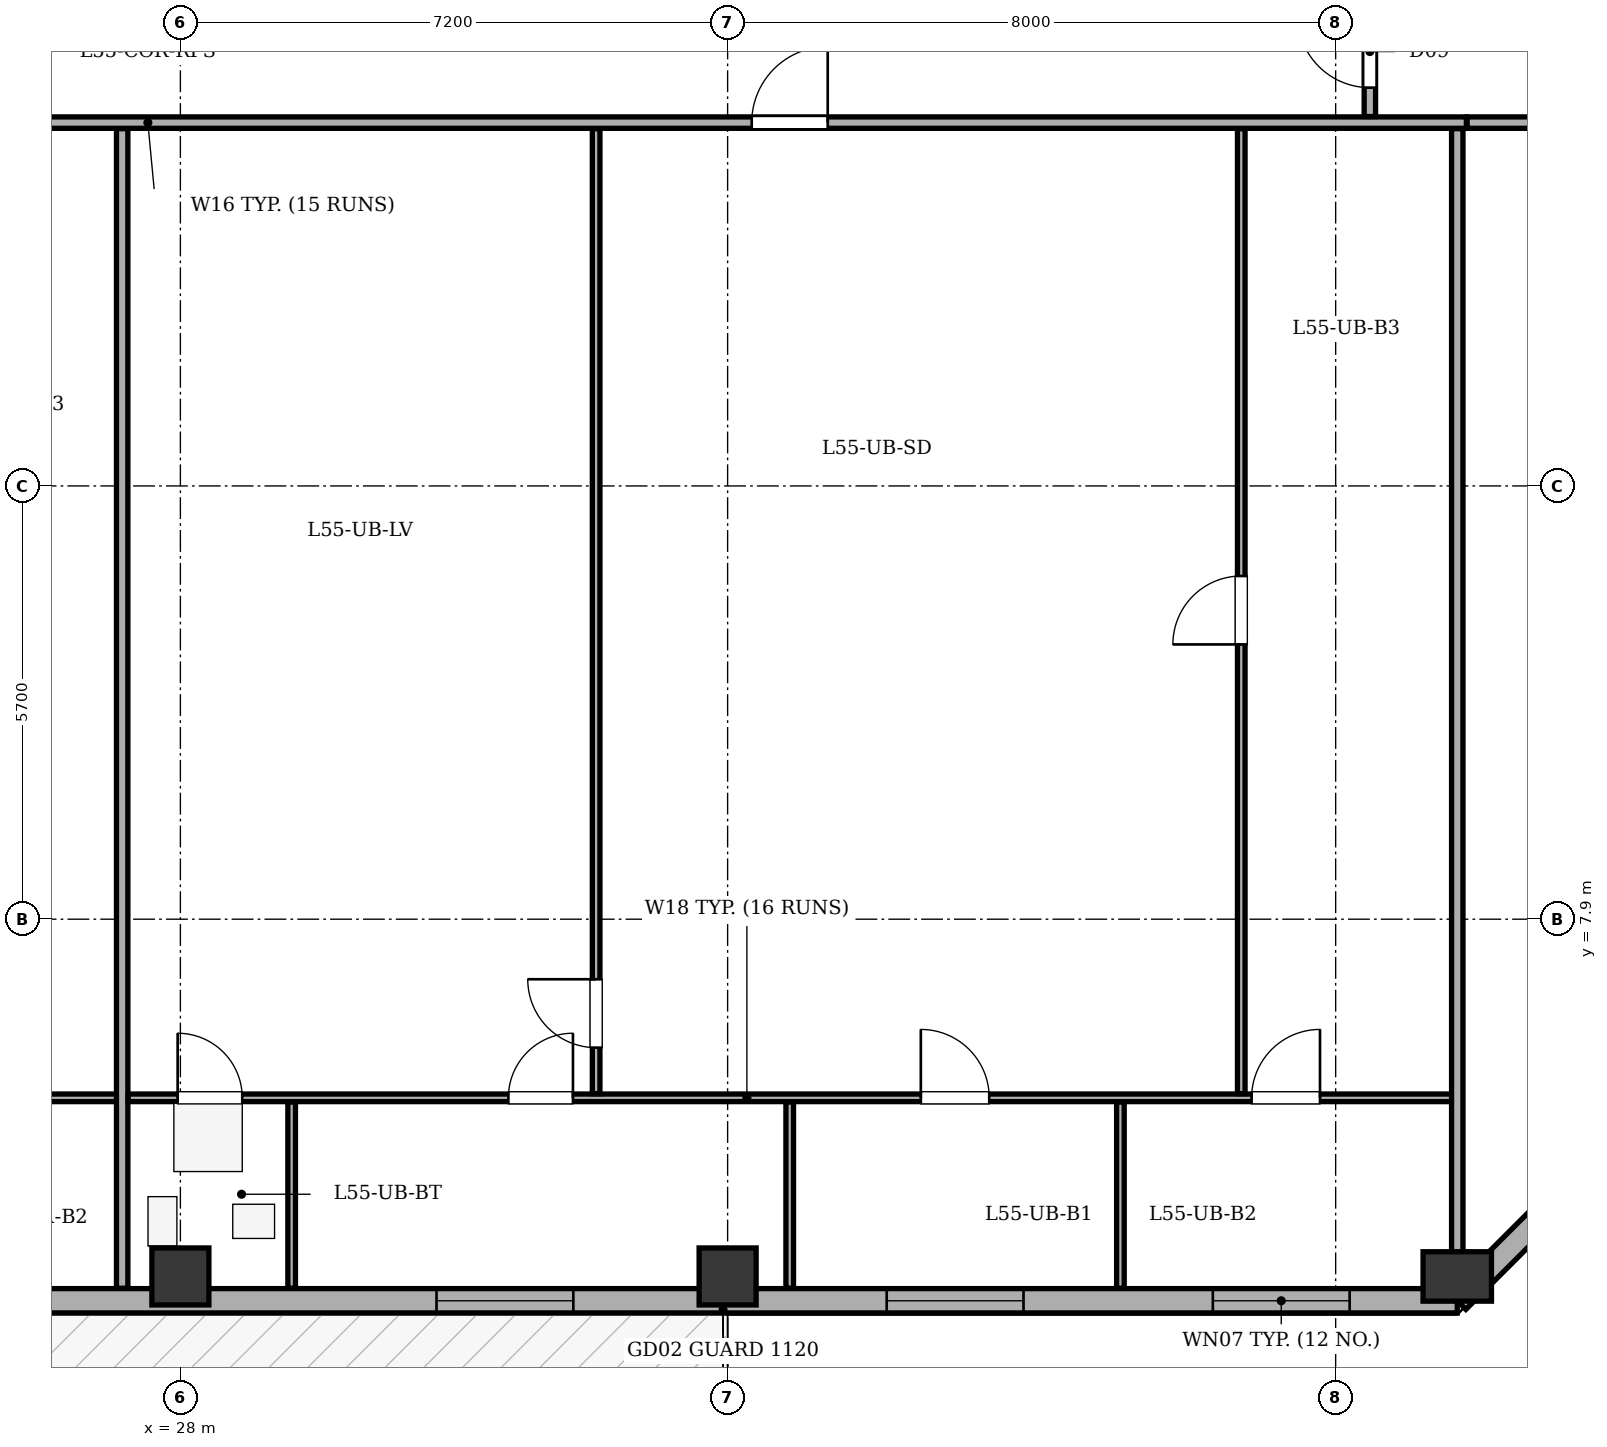
"""IFC4 building model, lengths in metres.
Left out: names, types, materials, properties, quantities, classifications, styles, units other than length and angle.
Written with IfcOpenShell. Run it as: python <this file> out.ifc"""

import sys

from ifc_helpers import new_model, si_unit, direction, frame, frame_2d, origin, origin_2d, place, context, subcontext, project, spatial, rectangle, extrude, element, fill, save


model = new_model("IFC4")
c1 = context("Model", 3, precision=1e-05, world=origin(), true_north=direction((0.0, 1.0)))
c2 = subcontext(c1, "Body", "Model", "MODEL_VIEW")
j1 = project(units=[si_unit("LENGTHUNIT", "METRE"), si_unit("PLANEANGLEUNIT", "RADIAN")], contexts=[c1])
p1 = place(None, origin())
s1 = spatial("IfcSite", under=j1, at=p1, CompositionType="ELEMENT")
p2 = place(p1, origin())
s2 = spatial("IfcBuilding", under=s1, at=p2, CompositionType="ELEMENT")
p3 = place(p2, frame((0.0, 0.0, 214.3)))
s3 = spatial("IfcBuildingStorey", under=s2, at=p3, CompositionType="ELEMENT", Elevation=214.3)
for number, where, z_axis, x_axis in (
    (1, (28.0, 3.2, 0.0), (0.0, 0.0, 1.0), (1.0, 0.0, 0.0)),
    (2, (35.2, 3.2, 0.0), (0.0, 0.0, 1.0), (1.0, 0.0, 0.0)),
):
    element("IfcColumn", number, at=place(p3, frame(where, z_axis=z_axis, x_axis=x_axis)), inside=s3, PredefinedType="COLUMN", context=c2, shape_type="SweptSolid", body=[
        extrude(rectangle(XDim=0.75, YDim=0.75, at=origin_2d()), origin(), (0.0, 0.0, 1.0), 3.4),
    ])
p4 = place(p3, frame((44.8, 3.2, 0.0), z_axis=(0.0, 0.0, 1.0), x_axis=(1.0, 0.0, 0.0)))
e3 = element("IfcColumn", 3, at=p4, inside=s3, PredefinedType="COLUMN", context=c2, shape_type="SweptSolid", body=[
    extrude(rectangle(XDim=0.65, YDim=0.9, at=origin_2d()), origin(), (0.0, 0.0, 1.0), 3.4),
])
p5 = place(p3, frame((44.8, 2.88, 0.0), z_axis=(0.0, 0.0, 1.0), x_axis=(-1.0, 0.0, 0.0)))
e4 = element("IfcWall", 4, at=p5, inside=s3, PredefinedType="STANDARD", context=c2, shape_type="SweptSolid", body=[
    extrude(rectangle(XDim=36.0, YDim=0.32, at=frame_2d((18.0, 0.0))), origin(), (0.0, 0.0, 1.0), 2.725),
])
p6 = place(p5, frame((20.1, 0.0, 0.0)))
e5 = element("IfcOpeningElement", 5, at=p6, cuts=e4, PredefinedType="OPENING", context=c2, shape_type="SweptSolid", body=[
    extrude(rectangle(XDim=1.0, YDim=2.02, at=frame_2d((0.5, 1.01))), frame((0.0, 0.17, 0.0), z_axis=(0.0, -1.0, 0.0), x_axis=(1.0, 0.0, 0.0)), (0.0, 0.0, 1.0), 0.34),
])
p7 = place(p5, frame((1.416, 0.0, 0.75)))
e6 = element("IfcOpeningElement", 6, at=p7, cuts=e4, PredefinedType="OPENING", context=c2, shape_type="SweptSolid", body=[
    extrude(rectangle(XDim=1.8, YDim=1.7, at=frame_2d((0.9, 0.85))), frame((0.0, 0.17, 0.0), z_axis=(0.0, -1.0, 0.0), x_axis=(1.0, 0.0, 0.0)), (0.0, 0.0, 1.0), 0.34),
])
p8 = place(p5, frame((5.707, 0.0, 0.75)))
e7 = element("IfcOpeningElement", 7, at=p8, cuts=e4, PredefinedType="OPENING", context=c2, shape_type="SweptSolid", body=[
    extrude(rectangle(XDim=1.8, YDim=1.7, at=frame_2d((0.9, 0.85))), frame((0.0, 0.17, 0.0), z_axis=(0.0, -1.0, 0.0), x_axis=(1.0, 0.0, 0.0)), (0.0, 0.0, 1.0), 0.34),
])
p9 = place(p5, frame((11.63, 0.0, 0.75)))
e8 = element("IfcOpeningElement", 8, at=p9, cuts=e4, PredefinedType="OPENING", context=c2, shape_type="SweptSolid", body=[
    extrude(rectangle(XDim=1.8, YDim=1.7, at=frame_2d((0.9, 0.85))), frame((0.0, 0.17, 0.0), z_axis=(0.0, -1.0, 0.0), x_axis=(1.0, 0.0, 0.0)), (0.0, 0.0, 1.0), 0.34),
])
p10 = place(p5, frame((27.712, 0.0, 0.75)))
e9 = element("IfcOpeningElement", 9, at=p10, cuts=e4, PredefinedType="OPENING", context=c2, shape_type="SweptSolid", body=[
    extrude(rectangle(XDim=1.8, YDim=1.7, at=frame_2d((0.9, 0.85))), frame((0.0, 0.17, 0.0), z_axis=(0.0, -1.0, 0.0), x_axis=(1.0, 0.0, 0.0)), (0.0, 0.0, 1.0), 0.34),
])
p11 = place(p5, frame((22.367, 0.0, 0.75)))
e10 = element("IfcOpeningElement", 10, at=p11, cuts=e4, PredefinedType="OPENING", context=c2, shape_type="SweptSolid", body=[
    extrude(rectangle(XDim=0.75, YDim=1.45, at=frame_2d((0.375, 0.725))), frame((0.0, 0.17, 0.0), z_axis=(0.0, -1.0, 0.0), x_axis=(1.0, 0.0, 0.0)), (0.0, 0.0, 1.0), 0.34),
])
p12 = place(p3, frame((49.12, 7.2, 0.0), z_axis=(0.0, 0.0, 1.0), x_axis=(-0.707106781187, -0.707106781187, 0.0)))
e11 = element("IfcWall", 11, at=p12, inside=s3, PredefinedType="STANDARD", context=c2, shape_type="SweptSolid", body=[
    extrude(rectangle(XDim=6.11, YDim=0.32, at=frame_2d((3.055, 0.0))), origin(), (0.0, 0.0, 1.0), 2.725),
])
p13 = place(p12, frame((2.355, 0.0, 0.75)))
e12 = element("IfcOpeningElement", 12, at=p13, cuts=e11, PredefinedType="OPENING", context=c2, shape_type="SweptSolid", body=[
    extrude(rectangle(XDim=1.4, YDim=1.65, at=frame_2d((0.7, 0.825))), frame((0.0, 0.17, 0.0), z_axis=(0.0, -1.0, 0.0), x_axis=(1.0, 0.0, 0.0)), (0.0, 0.0, 1.0), 0.34),
])
p14 = place(p3, frame((10.9, 18.38, 0.0), z_axis=(0.0, 0.0, 1.0), x_axis=(1.0, 0.0, 0.0)))
e13 = element("IfcWall", 13, at=p14, inside=s3, PredefinedType="PARTITIONING", context=c2, shape_type="SweptSolid", body=[
    extrude(rectangle(XDim=34.02, YDim=0.15, at=frame_2d((17.01, 0.0))), origin(), (0.0, 0.0, 1.0), 3.1),
])
p15 = place(p14, frame((7.727, 0.0, 0.0)))
e14 = element("IfcOpeningElement", 14, at=p15, cuts=e13, PredefinedType="OPENING", context=c2, shape_type="SweptSolid", body=[
    extrude(rectangle(XDim=1.0, YDim=2.1, at=frame_2d((0.5, 1.05))), frame((0.0, 0.085, 0.0), z_axis=(0.0, -1.0, 0.0), x_axis=(1.0, 0.0, 0.0)), (0.0, 0.0, 1.0), 0.17),
])
p16 = place(p14, frame((24.617, 0.0, 0.0)))
e15 = element("IfcOpeningElement", 15, at=p16, cuts=e13, PredefinedType="OPENING", context=c2, shape_type="SweptSolid", body=[
    extrude(rectangle(XDim=1.0, YDim=2.1, at=frame_2d((0.5, 1.05))), frame((0.0, 0.085, 0.0), z_axis=(0.0, -1.0, 0.0), x_axis=(1.0, 0.0, 0.0)), (0.0, 0.0, 1.0), 0.17),
])
p17 = place(p3, frame((11.1, 5.55, 0.0), z_axis=(0.0, 0.0, 1.0), x_axis=(1.0, 0.0, 0.0)))
e16 = element("IfcWall", 16, at=p17, inside=s3, PredefinedType="PARTITIONING", context=c2, shape_type="SweptSolid", body=[
    extrude(rectangle(XDim=16.174, YDim=0.1, at=frame_2d((8.087, 0.0))), origin(), (0.0, 0.0, 1.0), 3.1),
])
p18 = place(p17, frame((0.65, 0.0, 0.0)))
e17 = element("IfcOpeningElement", 17, at=p18, cuts=e16, PredefinedType="OPENING", context=c2, shape_type="SweptSolid", body=[
    extrude(rectangle(XDim=0.85, YDim=2.05, at=frame_2d((0.425, 1.025))), frame((0.0, 0.06, 0.0), z_axis=(0.0, -1.0, 0.0), x_axis=(1.0, 0.0, 0.0)), (0.0, 0.0, 1.0), 0.12),
])
p19 = place(p17, frame((4.664, 0.0, 0.0)))
e18 = element("IfcOpeningElement", 18, at=p19, cuts=e16, PredefinedType="OPENING", context=c2, shape_type="SweptSolid", body=[
    extrude(rectangle(XDim=0.85, YDim=2.05, at=frame_2d((0.425, 1.025))), frame((0.0, 0.06, 0.0), z_axis=(0.0, -1.0, 0.0), x_axis=(1.0, 0.0, 0.0)), (0.0, 0.0, 1.0), 0.12),
])
p20 = place(p17, frame((9.584, 0.0, 0.0)))
e19 = element("IfcOpeningElement", 19, at=p20, cuts=e16, PredefinedType="OPENING", context=c2, shape_type="SweptSolid", body=[
    extrude(rectangle(XDim=0.9, YDim=2.05, at=frame_2d((0.45, 1.025))), frame((0.0, 0.06, 0.0), z_axis=(0.0, -1.0, 0.0), x_axis=(1.0, 0.0, 0.0)), (0.0, 0.0, 1.0), 0.12),
])
p21 = place(p17, frame((13.598, 0.0, 0.0)))
e20 = element("IfcOpeningElement", 20, at=p21, cuts=e16, PredefinedType="OPENING", context=c2, shape_type="SweptSolid", body=[
    extrude(rectangle(XDim=0.9, YDim=2.05, at=frame_2d((0.45, 1.025))), frame((0.0, 0.06, 0.0), z_axis=(0.0, -1.0, 0.0), x_axis=(1.0, 0.0, 0.0)), (0.0, 0.0, 1.0), 0.12),
])
p22 = place(p3, frame((27.234, 3.045, 0.0), z_axis=(0.0, 0.0, 1.0), x_axis=(0.0, 1.0, 0.0)))
e21 = element("IfcWall", 21, at=p22, inside=s3, PredefinedType="PARTITIONING", context=c2, shape_type="SweptSolid", body=[
    extrude(rectangle(XDim=15.255, YDim=0.15, at=frame_2d((7.627, 0.0))), origin(), (0.0, 0.0, 1.0), 3.1),
])
p23 = place(p3, frame((27.314, 5.55, 0.0), z_axis=(0.0, 0.0, 1.0), x_axis=(1.0, 0.0, 0.0)))
e22 = element("IfcWall", 22, at=p23, inside=s3, PredefinedType="PARTITIONING", context=c2, shape_type="SweptSolid", body=[
    extrude(rectangle(XDim=17.526, YDim=0.1, at=frame_2d((8.763, 0.0))), origin(), (0.0, 0.0, 1.0), 3.1),
])
p24 = place(p23, frame((0.65, 0.0, 0.0)))
e23 = element("IfcOpeningElement", 23, at=p24, cuts=e22, PredefinedType="OPENING", context=c2, shape_type="SweptSolid", body=[
    extrude(rectangle(XDim=0.85, YDim=2.05, at=frame_2d((0.425, 1.025))), frame((0.0, 0.06, 0.0), z_axis=(0.0, -1.0, 0.0), x_axis=(1.0, 0.0, 0.0)), (0.0, 0.0, 1.0), 0.12),
])
p25 = place(p23, frame((5.001, 0.0, 0.0)))
e24 = element("IfcOpeningElement", 24, at=p25, cuts=e22, PredefinedType="OPENING", context=c2, shape_type="SweptSolid", body=[
    extrude(rectangle(XDim=0.85, YDim=2.05, at=frame_2d((0.425, 1.025))), frame((0.0, 0.06, 0.0), z_axis=(0.0, -1.0, 0.0), x_axis=(1.0, 0.0, 0.0)), (0.0, 0.0, 1.0), 0.12),
])
p26 = place(p23, frame((10.428, 0.0, 0.0)))
e25 = element("IfcOpeningElement", 25, at=p26, cuts=e22, PredefinedType="OPENING", context=c2, shape_type="SweptSolid", body=[
    extrude(rectangle(XDim=0.9, YDim=2.05, at=frame_2d((0.45, 1.025))), frame((0.0, 0.06, 0.0), z_axis=(0.0, -1.0, 0.0), x_axis=(1.0, 0.0, 0.0)), (0.0, 0.0, 1.0), 0.12),
])
p27 = place(p23, frame((14.78, 0.0, 0.0)))
e26 = element("IfcOpeningElement", 26, at=p27, cuts=e22, PredefinedType="OPENING", context=c2, shape_type="SweptSolid", body=[
    extrude(rectangle(XDim=0.9, YDim=2.05, at=frame_2d((0.45, 1.025))), frame((0.0, 0.06, 0.0), z_axis=(0.0, -1.0, 0.0), x_axis=(1.0, 0.0, 0.0)), (0.0, 0.0, 1.0), 0.12),
])
p28 = place(p3, frame((41.958, 5.605, 0.0), z_axis=(0.0, 0.0, 1.0), x_axis=(0.0, 1.0, 0.0)))
e27 = element("IfcWall", 27, at=p28, inside=s3, PredefinedType="PARTITIONING", context=c2, shape_type="SweptSolid", body=[
    extrude(rectangle(XDim=12.695, YDim=0.1, at=frame_2d((6.348, 0.0))), origin(), (0.0, 0.0, 1.0), 2.725),
])
p29 = place(p28, frame((5.91, 0.0, 0.0)))
e28 = element("IfcOpeningElement", 28, at=p29, cuts=e27, PredefinedType="OPENING", context=c2, shape_type="SweptSolid", body=[
    extrude(rectangle(XDim=0.9, YDim=2.05, at=frame_2d((0.45, 1.025))), frame((0.0, 0.06, 0.0), z_axis=(0.0, -1.0, 0.0), x_axis=(1.0, 0.0, 0.0)), (0.0, 0.0, 1.0), 0.12),
])
p30 = place(p3, frame((33.47, 5.605, 0.0), z_axis=(0.0, 0.0, 1.0), x_axis=(0.0, 1.0, 0.0)))
e29 = element("IfcWall", 29, at=p30, inside=s3, PredefinedType="PARTITIONING", context=c2, shape_type="SweptSolid", body=[
    extrude(rectangle(XDim=12.695, YDim=0.1, at=frame_2d((6.348, 0.0))), origin(), (0.0, 0.0, 1.0), 2.725),
])
p31 = place(p30, frame((0.605, 0.0, 0.0)))
e30 = element("IfcOpeningElement", 30, at=p31, cuts=e29, PredefinedType="OPENING", context=c2, shape_type="SweptSolid", body=[
    extrude(rectangle(XDim=0.9, YDim=2.05, at=frame_2d((0.45, 1.025))), frame((0.0, 0.06, 0.0), z_axis=(0.0, -1.0, 0.0), x_axis=(1.0, 0.0, 0.0)), (0.0, 0.0, 1.0), 0.12),
])
for number, where, z_axis, x_axis in (
    (31, (29.464, 3.045, 0.0), (0.0, 0.0, 1.0), (0.0, 1.0, 0.0)),
    (32, (36.017, 3.045, 0.0), (0.0, 0.0, 1.0), (0.0, 1.0, 0.0)),
):
    element("IfcWall", number, at=place(p3, frame(where, z_axis=z_axis, x_axis=x_axis)), inside=s3, PredefinedType="PARTITIONING", context=c2, shape_type="SweptSolid", body=[
        extrude(rectangle(XDim=2.45, YDim=0.1, at=frame_2d((1.225, 0.0))), origin(), (0.0, 0.0, 1.0), 3.1),
    ])
p32 = place(p3, frame((40.368, 3.045, 0.0), z_axis=(0.0, 0.0, 1.0), x_axis=(0.0, 1.0, 0.0)))
e33 = element("IfcWall", 33, at=p32, inside=s3, PredefinedType="PARTITIONING", context=c2, shape_type="SweptSolid", body=[
    extrude(rectangle(XDim=2.45, YDim=0.1, at=frame_2d((1.225, 0.0))), origin(), (0.0, 0.0, 1.0), 2.725),
])
p33 = place(p3, frame((44.8, 3.045, 0.0), z_axis=(0.0, 0.0, 1.0), x_axis=(0.0, 1.0, 0.0)))
e34 = element("IfcWall", 34, at=p33, inside=s3, PredefinedType="PARTITIONING", context=c2, shape_type="SweptSolid", body=[
    extrude(rectangle(XDim=15.255, YDim=0.15, at=frame_2d((7.627, 0.0))), origin(), (0.0, 0.0, 1.0), 3.1),
])
p34 = place(p3, frame((44.93, 18.38, 0.0), z_axis=(0.0, 0.0, 1.0), x_axis=(1.0, 0.0, 0.0)))
e35 = element("IfcWall", 35, at=p34, inside=s3, PredefinedType="PARTITIONING", context=c2, shape_type="SweptSolid", body=[
    extrude(rectangle(XDim=4.025, YDim=0.15, at=frame_2d((2.013, 0.0))), origin(), (0.0, 0.0, 1.0), 3.1),
])
p35 = place(p3, frame((43.65, 18.46, 0.0), z_axis=(0.0, 0.0, 1.0), x_axis=(0.0, 1.0, 0.0)))
e36 = element("IfcWall", 36, at=p35, inside=s3, PredefinedType="PARTITIONING", context=c2, shape_type="SweptSolid", body=[
    extrude(rectangle(XDim=1.79, YDim=0.15, at=frame_2d((0.895, 0.0))), origin(), (0.0, 0.0, 1.0), 3.1),
])
p36 = place(p35, frame((0.38, 0.0, 0.0)))
e37 = element("IfcOpeningElement", 37, at=p36, cuts=e36, PredefinedType="OPENING", context=c2, shape_type="SweptSolid", body=[
    extrude(rectangle(XDim=0.95, YDim=2.1, at=frame_2d((0.475, 1.05))), frame((0.0, 0.085, 0.0), z_axis=(0.0, -1.0, 0.0), x_axis=(1.0, 0.0, 0.0)), (0.0, 0.0, 1.0), 0.17),
])
p37 = place(p7, origin())
e38 = element("IfcWindow", 38, at=p37, inside=s3, PartitioningType="SINGLE_PANEL", PredefinedType="WINDOW", context=c2, shape_type="SweptSolid", body=[
    extrude(rectangle(XDim=1.8, YDim=1.7, at=frame_2d((0.9, 0.85))), frame((0.0, -0.01, 0.0), z_axis=(0.0, -1.0, 0.0), x_axis=(1.0, 0.0, 0.0)), (0.0, 0.0, 1.0), 0.06),
])
fill(e6, e38)
p38 = place(p8, origin())
e39 = element("IfcWindow", 39, at=p38, inside=s3, PartitioningType="SINGLE_PANEL", PredefinedType="WINDOW", context=c2, shape_type="SweptSolid", body=[
    extrude(rectangle(XDim=1.8, YDim=1.7, at=frame_2d((0.9, 0.85))), frame((0.0, -0.01, 0.0), z_axis=(0.0, -1.0, 0.0), x_axis=(1.0, 0.0, 0.0)), (0.0, 0.0, 1.0), 0.06),
])
fill(e7, e39)
p39 = place(p9, origin())
e40 = element("IfcWindow", 40, at=p39, inside=s3, PartitioningType="SINGLE_PANEL", PredefinedType="WINDOW", context=c2, shape_type="SweptSolid", body=[
    extrude(rectangle(XDim=1.8, YDim=1.7, at=frame_2d((0.9, 0.85))), frame((0.0, -0.01, 0.0), z_axis=(0.0, -1.0, 0.0), x_axis=(1.0, 0.0, 0.0)), (0.0, 0.0, 1.0), 0.06),
])
fill(e8, e40)
p40 = place(p16, origin())
e41 = element("IfcDoor", 41, at=p40, inside=s3, OperationType="SINGLE_SWING_RIGHT", PredefinedType="DOOR", context=c2, shape_type="SweptSolid", body=[
    extrude(rectangle(XDim=1.0, YDim=2.1, at=frame_2d((0.5, 1.05))), frame((0.0, 0.025, 0.0), z_axis=(0.0, -1.0, 0.0), x_axis=(1.0, 0.0, 0.0)), (0.0, 0.0, 1.0), 0.05),
])
fill(e15, e41)
p41 = place(p29, origin())
e42 = element("IfcDoor", 42, at=p41, inside=s3, OperationType="SINGLE_SWING_LEFT", PredefinedType="DOOR", context=c2, shape_type="SweptSolid", body=[
    extrude(rectangle(XDim=0.9, YDim=2.05, at=frame_2d((0.45, 1.025))), frame((0.0, 0.025, 0.0), z_axis=(0.0, -1.0, 0.0), x_axis=(1.0, 0.0, 0.0)), (0.0, 0.0, 1.0), 0.05),
])
fill(e28, e42)
p42 = place(p31, origin())
e43 = element("IfcDoor", 43, at=p42, inside=s3, OperationType="SINGLE_SWING_RIGHT", PredefinedType="DOOR", context=c2, shape_type="SweptSolid", body=[
    extrude(rectangle(XDim=0.9, YDim=2.05, at=frame_2d((0.45, 1.025))), frame((0.0, 0.025, 0.0), z_axis=(0.0, -1.0, 0.0), x_axis=(1.0, 0.0, 0.0)), (0.0, 0.0, 1.0), 0.05),
])
fill(e30, e43)
p43 = place(p24, origin())
e44 = element("IfcDoor", 44, at=p43, inside=s3, OperationType="SINGLE_SWING_LEFT", PredefinedType="DOOR", context=c2, shape_type="SweptSolid", body=[
    extrude(rectangle(XDim=0.85, YDim=2.05, at=frame_2d((0.425, 1.025))), frame((0.0, 0.025, 0.0), z_axis=(0.0, -1.0, 0.0), x_axis=(1.0, 0.0, 0.0)), (0.0, 0.0, 1.0), 0.05),
])
fill(e23, e44)
p44 = place(p25, origin())
e45 = element("IfcDoor", 45, at=p44, inside=s3, OperationType="SINGLE_SWING_RIGHT", PredefinedType="DOOR", context=c2, shape_type="SweptSolid", body=[
    extrude(rectangle(XDim=0.85, YDim=2.05, at=frame_2d((0.425, 1.025))), frame((0.0, 0.025, 0.0), z_axis=(0.0, -1.0, 0.0), x_axis=(1.0, 0.0, 0.0)), (0.0, 0.0, 1.0), 0.05),
])
fill(e24, e45)
p45 = place(p26, origin())
e46 = element("IfcDoor", 46, at=p45, inside=s3, OperationType="SINGLE_SWING_LEFT", PredefinedType="DOOR", context=c2, shape_type="SweptSolid", body=[
    extrude(rectangle(XDim=0.9, YDim=2.05, at=frame_2d((0.45, 1.025))), frame((0.0, 0.025, 0.0), z_axis=(0.0, -1.0, 0.0), x_axis=(1.0, 0.0, 0.0)), (0.0, 0.0, 1.0), 0.05),
])
fill(e25, e46)
p46 = place(p27, origin())
e47 = element("IfcDoor", 47, at=p46, inside=s3, OperationType="SINGLE_SWING_RIGHT", PredefinedType="DOOR", context=c2, shape_type="SweptSolid", body=[
    extrude(rectangle(XDim=0.9, YDim=2.05, at=frame_2d((0.45, 1.025))), frame((0.0, 0.025, 0.0), z_axis=(0.0, -1.0, 0.0), x_axis=(1.0, 0.0, 0.0)), (0.0, 0.0, 1.0), 0.05),
])
fill(e26, e47)
p47 = place(p36, origin())
e48 = element("IfcDoor", 48, at=p47, inside=s3, OperationType="SINGLE_SWING_RIGHT", PredefinedType="DOOR", context=c2, shape_type="SweptSolid", body=[
    extrude(rectangle(XDim=0.95, YDim=2.1, at=frame_2d((0.475, 1.05))), frame((0.0, 0.025, 0.0), z_axis=(0.0, -1.0, 0.0), x_axis=(1.0, 0.0, 0.0)), (0.0, 0.0, 1.0), 0.05),
])
fill(e37, e48)
save(model, sys.argv[1])
